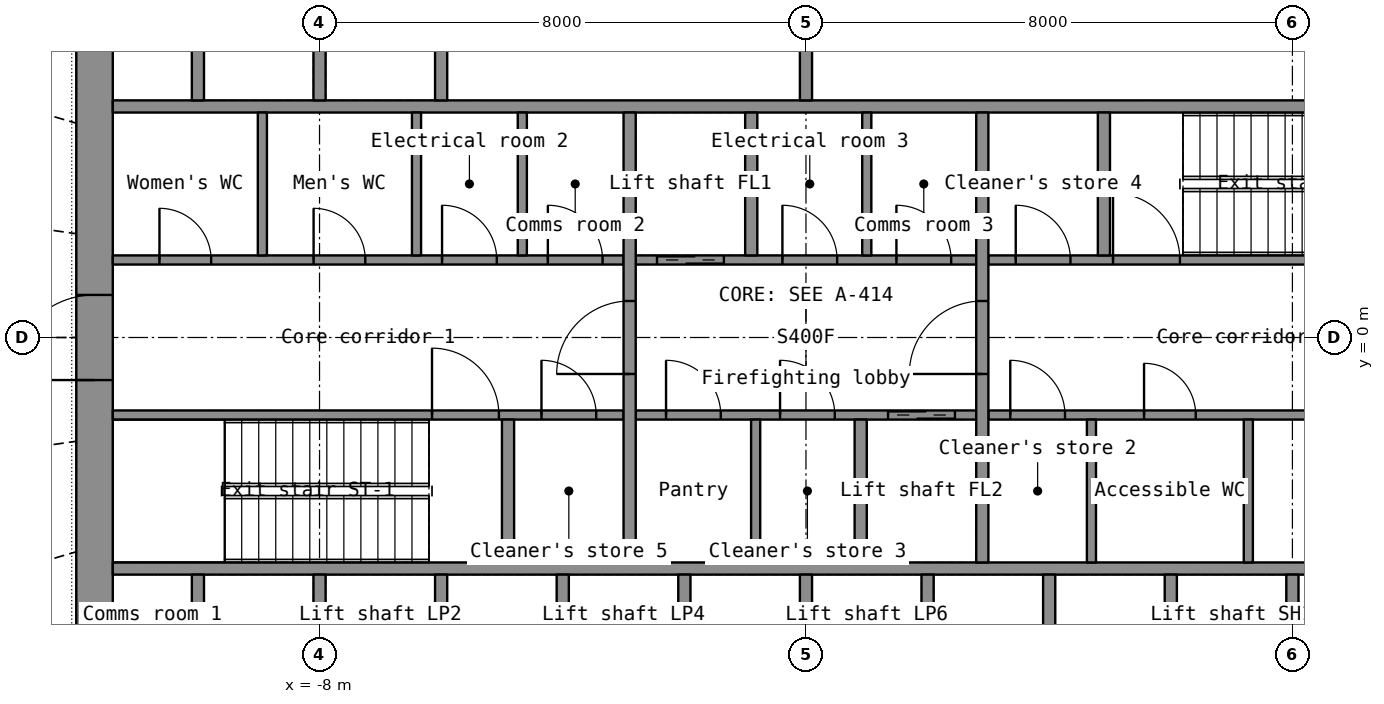
"""IFC4 building model, lengths in metres.
Left out: names, types, materials, properties, quantities, classifications, styles, units other than length and angle.
Written with IfcOpenShell. Run it as: python <this file> out.ifc"""

import sys

from ifc_helpers import new_model, si_unit, direction, frame, frame_2d, origin, place, context, subcontext, project, spatial, rectangle, extrude, element, fill, save


model = new_model("IFC4")
c1 = context("Model", 3, precision=1e-05, world=origin(), true_north=direction((0.0, 1.0)))
c2 = subcontext(c1, "Body", "Model", "MODEL_VIEW")
j1 = project(units=[si_unit("LENGTHUNIT", "METRE"), si_unit("PLANEANGLEUNIT", "RADIAN")], contexts=[c1])
p1 = place(None, origin())
s1 = spatial("IfcSite", under=j1, at=p1, CompositionType="ELEMENT")
p2 = place(p1, origin())
s2 = spatial("IfcBuilding", under=s1, at=p2, CompositionType="ELEMENT")
p3 = place(p2, frame((0.0, 0.0, 92.6)))
s3 = spatial("IfcBuildingStorey", under=s2, at=p3, CompositionType="ELEMENT", Elevation=92.6)
p4 = place(p3, frame((-11.7, -7.2, 0.0), z_axis=(0.0, 0.0, 1.0), x_axis=(0.0, 1.0, 0.0)))
e1 = element("IfcWall", 1, at=p4, inside=s3, PredefinedType="SHEAR", context=c2, shape_type="SweptSolid", body=[
    extrude(rectangle(XDim=14.4, YDim=0.6, at=frame_2d((7.2, 0.0))), origin(), (0.0, 0.0, 1.0), 4.1),
])
p5 = place(p4, frame((6.5, 0.0, 0.0)))
e2 = element("IfcOpeningElement", 2, at=p5, cuts=e1, PredefinedType="OPENING", context=c2, shape_type="SweptSolid", body=[
    extrude(rectangle(XDim=1.4, YDim=2.2, at=frame_2d((0.7, 1.1))), frame((0.0, 0.31, 0.0), z_axis=(0.0, -1.0, 0.0), x_axis=(1.0, 0.0, 0.0)), (0.0, 0.0, 1.0), 0.62),
])
for number, where, z_axis, x_axis in (
    (3, (-11.4, -3.8, 0.0), (0.0, 0.0, 1.0), (1.0, 0.0, 0.0)),
    (4, (-11.4, 3.8, 0.0), (0.0, 0.0, 1.0), (1.0, 0.0, 0.0)),
):
    element("IfcWall", number, at=place(p3, frame(where, z_axis=z_axis, x_axis=x_axis)), inside=s3, PredefinedType="SHEAR", context=c2, shape_type="SweptSolid", body=[
        extrude(rectangle(XDim=22.8, YDim=0.2, at=frame_2d((11.4, 0.0))), origin(), (0.0, 0.0, 1.0), 4.1),
    ])
for number, where, z_axis, x_axis in (
    (5, (-10.0, -6.6, 0.0), (0.0, 0.0, 1.0), (0.0, 1.0, 0.0)),
    (6, (-8.0, -6.6, 0.0), (0.0, 0.0, 1.0), (0.0, 1.0, 0.0)),
    (7, (-6.0, -6.6, 0.0), (0.0, 0.0, 1.0), (0.0, 1.0, 0.0)),
    (8, (-4.0, -6.6, 0.0), (0.0, 0.0, 1.0), (0.0, 1.0, 0.0)),
    (9, (-2.0, -6.6, 0.0), (0.0, 0.0, 1.0), (0.0, 1.0, 0.0)),
    (10, (0.0, -6.6, 0.0), (0.0, 0.0, 1.0), (0.0, 1.0, 0.0)),
    (11, (2.0, -6.6, 0.0), (0.0, 0.0, 1.0), (0.0, 1.0, 0.0)),
    (12, (4.0, -6.6, 0.0), (0.0, 0.0, 1.0), (0.0, 1.0, 0.0)),
    (13, (6.0, -6.6, 0.0), (0.0, 0.0, 1.0), (0.0, 1.0, 0.0)),
    (14, (8.0, -6.6, 0.0), (0.0, 0.0, 1.0), (0.0, 1.0, 0.0)),
    (15, (-10.0, 3.9, 0.0), (0.0, 0.0, 1.0), (0.0, 1.0, 0.0)),
    (16, (-8.0, 3.9, 0.0), (0.0, 0.0, 1.0), (0.0, 1.0, 0.0)),
    (17, (-6.0, 3.9, 0.0), (0.0, 0.0, 1.0), (0.0, 1.0, 0.0)),
):
    element("IfcWall", number, at=place(p3, frame(where, z_axis=z_axis, x_axis=x_axis)), inside=s3, PredefinedType="SHEAR", context=c2, shape_type="SweptSolid", body=[
        extrude(rectangle(XDim=2.7, YDim=0.2, at=frame_2d((1.35, 0.0))), origin(), (0.0, 0.0, 1.0), 4.1),
    ])
p6 = place(p3, frame((0.0, 3.9, 0.0), z_axis=(0.0, 0.0, 1.0), x_axis=(0.0, 1.0, 0.0)))
e18 = element("IfcWall", 18, at=p6, inside=s3, PredefinedType="PARTITIONING", context=c2, shape_type="SweptSolid", body=[
    extrude(rectangle(XDim=2.7, YDim=0.2, at=frame_2d((1.35, 0.0))), origin(), (0.0, 0.0, 1.0), 4.1),
])
p7 = place(p3, frame((-11.4, -1.275, 0.0), z_axis=(0.0, 0.0, 1.0), x_axis=(1.0, 0.0, 0.0)))
e19 = element("IfcWall", 19, at=p7, inside=s3, PredefinedType="SHEAR", context=c2, shape_type="SweptSolid", body=[
    extrude(rectangle(XDim=8.4, YDim=0.15, at=frame_2d((4.2, 0.0))), origin(), (0.0, 0.0, 1.0), 4.1),
])
p8 = place(p7, frame((5.25, 0.0, 0.0)))
e20 = element("IfcOpeningElement", 20, at=p8, cuts=e19, PredefinedType="OPENING", context=c2, shape_type="SweptSolid", body=[
    extrude(rectangle(XDim=1.1, YDim=2.15, at=frame_2d((0.55, 1.075))), frame((0.0, 0.085, 0.0), z_axis=(0.0, -1.0, 0.0), x_axis=(1.0, 0.0, 0.0)), (0.0, 0.0, 1.0), 0.17),
])
p9 = place(p7, frame((7.05, 0.0, 0.0)))
e21 = element("IfcOpeningElement", 21, at=p9, cuts=e19, PredefinedType="OPENING", context=c2, shape_type="SweptSolid", body=[
    extrude(rectangle(XDim=0.9, YDim=2.1, at=frame_2d((0.45, 1.05))), frame((0.0, 0.085, 0.0), z_axis=(0.0, -1.0, 0.0), x_axis=(1.0, 0.0, 0.0)), (0.0, 0.0, 1.0), 0.17),
])
p10 = place(p3, frame((-2.8, -1.275, 0.0), z_axis=(0.0, 0.0, 1.0), x_axis=(1.0, 0.0, 0.0)))
e22 = element("IfcWall", 22, at=p10, inside=s3, PredefinedType="SHEAR", context=c2, shape_type="SweptSolid", body=[
    extrude(rectangle(XDim=5.6, YDim=0.15, at=frame_2d((2.8, 0.0))), origin(), (0.0, 0.0, 1.0), 4.1),
])
p11 = place(p10, frame((4.15, 0.0, 0.0)))
e23 = element("IfcOpeningElement", 23, at=p11, cuts=e22, PredefinedType="OPENING", context=c2, shape_type="SweptSolid", body=[
    extrude(rectangle(XDim=1.1, YDim=2.2, at=frame_2d((0.55, 1.1))), frame((0.0, 0.085, 0.0), z_axis=(0.0, -1.0, 0.0), x_axis=(1.0, 0.0, 0.0)), (0.0, 0.0, 1.0), 0.17),
])
p12 = place(p10, frame((0.499, 0.0, 0.0)))
e24 = element("IfcOpeningElement", 24, at=p12, cuts=e22, PredefinedType="OPENING", context=c2, shape_type="SweptSolid", body=[
    extrude(rectangle(XDim=0.9, YDim=2.1, at=frame_2d((0.45, 1.05))), frame((0.0, 0.085, 0.0), z_axis=(0.0, -1.0, 0.0), x_axis=(1.0, 0.0, 0.0)), (0.0, 0.0, 1.0), 0.17),
])
p13 = place(p10, frame((2.374, 0.0, 0.0)))
e25 = element("IfcOpeningElement", 25, at=p13, cuts=e22, PredefinedType="OPENING", context=c2, shape_type="SweptSolid", body=[
    extrude(rectangle(XDim=0.9, YDim=2.1, at=frame_2d((0.45, 1.05))), frame((0.0, 0.085, 0.0), z_axis=(0.0, -1.0, 0.0), x_axis=(1.0, 0.0, 0.0)), (0.0, 0.0, 1.0), 0.17),
])
p14 = place(p3, frame((3.0, -1.275, 0.0), z_axis=(0.0, 0.0, 1.0), x_axis=(1.0, 0.0, 0.0)))
e26 = element("IfcWall", 26, at=p14, inside=s3, PredefinedType="PARTITIONING", context=c2, shape_type="SweptSolid", body=[
    extrude(rectangle(XDim=8.4, YDim=0.15, at=frame_2d((4.2, 0.0))), origin(), (0.0, 0.0, 1.0), 4.1),
])
p15 = place(p14, frame((0.36, 0.0, 0.0)))
e27 = element("IfcOpeningElement", 27, at=p15, cuts=e26, PredefinedType="OPENING", context=c2, shape_type="SweptSolid", body=[
    extrude(rectangle(XDim=0.9, YDim=2.1, at=frame_2d((0.45, 1.05))), frame((0.0, 0.085, 0.0), z_axis=(0.0, -1.0, 0.0), x_axis=(1.0, 0.0, 0.0)), (0.0, 0.0, 1.0), 0.17),
])
p16 = place(p14, frame((2.56, 0.0, 0.0)))
e28 = element("IfcOpeningElement", 28, at=p16, cuts=e26, PredefinedType="OPENING", context=c2, shape_type="SweptSolid", body=[
    extrude(rectangle(XDim=0.85, YDim=2.1, at=frame_2d((0.425, 1.05))), frame((0.0, 0.085, 0.0), z_axis=(0.0, -1.0, 0.0), x_axis=(1.0, 0.0, 0.0)), (0.0, 0.0, 1.0), 0.17),
])
p17 = place(p14, frame((5.95, 0.0, 0.0)))
e29 = element("IfcOpeningElement", 29, at=p17, cuts=e26, PredefinedType="OPENING", context=c2, shape_type="SweptSolid", body=[
    extrude(rectangle(XDim=0.85, YDim=2.1, at=frame_2d((0.425, 1.05))), frame((0.0, 0.085, 0.0), z_axis=(0.0, -1.0, 0.0), x_axis=(1.0, 0.0, 0.0)), (0.0, 0.0, 1.0), 0.17),
])
p18 = place(p3, frame((-11.4, 1.275, 0.0), z_axis=(0.0, 0.0, 1.0), x_axis=(1.0, 0.0, 0.0)))
e30 = element("IfcWall", 30, at=p18, inside=s3, PredefinedType="PARTITIONING", context=c2, shape_type="SweptSolid", body=[
    extrude(rectangle(XDim=8.4, YDim=0.15, at=frame_2d((4.2, 0.0))), origin(), (0.0, 0.0, 1.0), 4.1),
])
p19 = place(p18, frame((0.768, 0.0, 0.0)))
e31 = element("IfcOpeningElement", 31, at=p19, cuts=e30, PredefinedType="OPENING", context=c2, shape_type="SweptSolid", body=[
    extrude(rectangle(XDim=0.85, YDim=2.1, at=frame_2d((0.425, 1.05))), frame((0.0, 0.085, 0.0), z_axis=(0.0, -1.0, 0.0), x_axis=(1.0, 0.0, 0.0)), (0.0, 0.0, 1.0), 0.17),
])
p20 = place(p18, frame((3.302, 0.0, 0.0)))
e32 = element("IfcOpeningElement", 32, at=p20, cuts=e30, PredefinedType="OPENING", context=c2, shape_type="SweptSolid", body=[
    extrude(rectangle(XDim=0.85, YDim=2.1, at=frame_2d((0.425, 1.05))), frame((0.0, 0.085, 0.0), z_axis=(0.0, -1.0, 0.0), x_axis=(1.0, 0.0, 0.0)), (0.0, 0.0, 1.0), 0.17),
])
p21 = place(p18, frame((5.415, 0.0, 0.0)))
e33 = element("IfcOpeningElement", 33, at=p21, cuts=e30, PredefinedType="OPENING", context=c2, shape_type="SweptSolid", body=[
    extrude(rectangle(XDim=0.9, YDim=2.1, at=frame_2d((0.45, 1.05))), frame((0.0, 0.085, 0.0), z_axis=(0.0, -1.0, 0.0), x_axis=(1.0, 0.0, 0.0)), (0.0, 0.0, 1.0), 0.17),
])
p22 = place(p18, frame((7.155, 0.0, 0.0)))
e34 = element("IfcOpeningElement", 34, at=p22, cuts=e30, PredefinedType="OPENING", context=c2, shape_type="SweptSolid", body=[
    extrude(rectangle(XDim=0.9, YDim=2.1, at=frame_2d((0.45, 1.05))), frame((0.0, 0.085, 0.0), z_axis=(0.0, -1.0, 0.0), x_axis=(1.0, 0.0, 0.0)), (0.0, 0.0, 1.0), 0.17),
])
p23 = place(p3, frame((-2.8, 1.275, 0.0), z_axis=(0.0, 0.0, 1.0), x_axis=(1.0, 0.0, 0.0)))
e35 = element("IfcWall", 35, at=p23, inside=s3, PredefinedType="SHEAR", context=c2, shape_type="SweptSolid", body=[
    extrude(rectangle(XDim=5.6, YDim=0.15, at=frame_2d((2.8, 0.0))), origin(), (0.0, 0.0, 1.0), 4.1),
])
p24 = place(p23, frame((0.35, 0.0, 0.0)))
e36 = element("IfcOpeningElement", 36, at=p24, cuts=e35, PredefinedType="OPENING", context=c2, shape_type="SweptSolid", body=[
    extrude(rectangle(XDim=1.1, YDim=2.2, at=frame_2d((0.55, 1.1))), frame((0.0, 0.085, 0.0), z_axis=(0.0, -1.0, 0.0), x_axis=(1.0, 0.0, 0.0)), (0.0, 0.0, 1.0), 0.17),
])
p25 = place(p23, frame((2.413, 0.0, 0.0)))
e37 = element("IfcOpeningElement", 37, at=p25, cuts=e35, PredefinedType="OPENING", context=c2, shape_type="SweptSolid", body=[
    extrude(rectangle(XDim=0.9, YDim=2.1, at=frame_2d((0.45, 1.05))), frame((0.0, 0.085, 0.0), z_axis=(0.0, -1.0, 0.0), x_axis=(1.0, 0.0, 0.0)), (0.0, 0.0, 1.0), 0.17),
])
p26 = place(p23, frame((4.288, 0.0, 0.0)))
e38 = element("IfcOpeningElement", 38, at=p26, cuts=e35, PredefinedType="OPENING", context=c2, shape_type="SweptSolid", body=[
    extrude(rectangle(XDim=0.9, YDim=2.1, at=frame_2d((0.45, 1.05))), frame((0.0, 0.085, 0.0), z_axis=(0.0, -1.0, 0.0), x_axis=(1.0, 0.0, 0.0)), (0.0, 0.0, 1.0), 0.17),
])
p27 = place(p3, frame((3.0, 1.275, 0.0), z_axis=(0.0, 0.0, 1.0), x_axis=(1.0, 0.0, 0.0)))
e39 = element("IfcWall", 39, at=p27, inside=s3, PredefinedType="SHEAR", context=c2, shape_type="SweptSolid", body=[
    extrude(rectangle(XDim=8.4, YDim=0.15, at=frame_2d((4.2, 0.0))), origin(), (0.0, 0.0, 1.0), 4.1),
])
p28 = place(p27, frame((2.05, 0.0, 0.0)))
e40 = element("IfcOpeningElement", 40, at=p28, cuts=e39, PredefinedType="OPENING", context=c2, shape_type="SweptSolid", body=[
    extrude(rectangle(XDim=1.1, YDim=2.15, at=frame_2d((0.55, 1.075))), frame((0.0, 0.085, 0.0), z_axis=(0.0, -1.0, 0.0), x_axis=(1.0, 0.0, 0.0)), (0.0, 0.0, 1.0), 0.17),
])
p29 = place(p27, frame((0.45, 0.0, 0.0)))
e41 = element("IfcOpeningElement", 41, at=p29, cuts=e39, PredefinedType="OPENING", context=c2, shape_type="SweptSolid", body=[
    extrude(rectangle(XDim=0.9, YDim=2.1, at=frame_2d((0.45, 1.05))), frame((0.0, 0.085, 0.0), z_axis=(0.0, -1.0, 0.0), x_axis=(1.0, 0.0, 0.0)), (0.0, 0.0, 1.0), 0.17),
])
p30 = place(p3, frame((-2.9, -3.7, 0.0), z_axis=(0.0, 0.0, 1.0), x_axis=(0.0, 1.0, 0.0)))
e42 = element("IfcWall", 42, at=p30, inside=s3, PredefinedType="SHEAR", context=c2, shape_type="SweptSolid", body=[
    extrude(rectangle(XDim=7.4, YDim=0.2, at=frame_2d((3.7, 0.0))), origin(), (0.0, 0.0, 1.0), 4.1),
])
p31 = place(p30, frame((3.1, 0.0, 0.0)))
e43 = element("IfcOpeningElement", 43, at=p31, cuts=e42, PredefinedType="OPENING", context=c2, shape_type="SweptSolid", body=[
    extrude(rectangle(XDim=1.2, YDim=2.2, at=frame_2d((0.6, 1.1))), frame((0.0, 0.11, 0.0), z_axis=(0.0, -1.0, 0.0), x_axis=(1.0, 0.0, 0.0)), (0.0, 0.0, 1.0), 0.22),
])
p32 = place(p3, frame((2.9, -3.7, 0.0), z_axis=(0.0, 0.0, 1.0), x_axis=(0.0, 1.0, 0.0)))
e44 = element("IfcWall", 44, at=p32, inside=s3, PredefinedType="SHEAR", context=c2, shape_type="SweptSolid", body=[
    extrude(rectangle(XDim=7.4, YDim=0.2, at=frame_2d((3.7, 0.0))), origin(), (0.0, 0.0, 1.0), 4.1),
])
p33 = place(p32, frame((3.1, 0.0, 0.0)))
e45 = element("IfcOpeningElement", 45, at=p33, cuts=e44, PredefinedType="OPENING", context=c2, shape_type="SweptSolid", body=[
    extrude(rectangle(XDim=1.2, YDim=2.2, at=frame_2d((0.6, 1.1))), frame((0.0, 0.11, 0.0), z_axis=(0.0, -1.0, 0.0), x_axis=(1.0, 0.0, 0.0)), (0.0, 0.0, 1.0), 0.22),
])
for number, where, z_axis, x_axis in (
    (46, (-0.9, 1.35, 0.0), (0.0, 0.0, 1.0), (0.0, 1.0, 0.0)),
    (47, (0.9, -3.7, 0.0), (0.0, 0.0, 1.0), (0.0, 1.0, 0.0)),
    (48, (-4.9, -3.7, 0.0), (0.0, 0.0, 1.0), (0.0, 1.0, 0.0)),
    (49, (4.9, 1.35, 0.0), (0.0, 0.0, 1.0), (0.0, 1.0, 0.0)),
):
    element("IfcWall", number, at=place(p3, frame(where, z_axis=z_axis, x_axis=x_axis)), inside=s3, PredefinedType="SHEAR", context=c2, shape_type="SweptSolid", body=[
        extrude(rectangle(XDim=2.35, YDim=0.2, at=frame_2d((1.175, 0.0))), origin(), (0.0, 0.0, 1.0), 4.1),
    ])
for number, where, z_axis, x_axis in (
    (50, (-8.94, 1.35, 0.0), (0.0, 0.0, 1.0), (0.0, 1.0, 0.0)),
    (51, (-6.405, 1.35, 0.0), (0.0, 0.0, 1.0), (0.0, 1.0, 0.0)),
    (52, (-4.665, 1.35, 0.0), (0.0, 0.0, 1.0), (0.0, 1.0, 0.0)),
    (53, (4.695, -3.7, 0.0), (0.0, 0.0, 1.0), (0.0, 1.0, 0.0)),
    (54, (7.275, -3.7, 0.0), (0.0, 0.0, 1.0), (0.0, 1.0, 0.0)),
    (55, (1.0, 1.35, 0.0), (0.0, 0.0, 1.0), (0.0, 1.0, 0.0)),
    (56, (-0.827, -3.7, 0.0), (0.0, 0.0, 1.0), (0.0, 1.0, 0.0)),
):
    element("IfcWall", number, at=place(p3, frame(where, z_axis=z_axis, x_axis=x_axis)), inside=s3, PredefinedType="PARTITIONING", context=c2, shape_type="SweptSolid", body=[
        extrude(rectangle(XDim=2.35, YDim=0.15, at=frame_2d((1.175, 0.0))), origin(), (0.0, 0.0, 1.0), 4.1),
    ])
p34 = place(p5, origin())
e57 = element("IfcDoor", 57, at=p34, inside=s3, OperationType="DOUBLE_DOOR_SINGLE_SWING", PredefinedType="DOOR", context=c2, shape_type="SweptSolid", body=[
    extrude(rectangle(XDim=1.4, YDim=2.2, at=frame_2d((0.7, 1.1))), frame((0.0, 0.025, 0.0), z_axis=(0.0, -1.0, 0.0), x_axis=(1.0, 0.0, 0.0)), (0.0, 0.0, 1.0), 0.05),
])
fill(e2, e57)
p35 = place(p31, origin())
e58 = element("IfcDoor", 58, at=p35, inside=s3, OperationType="SINGLE_SWING_LEFT", PredefinedType="DOOR", context=c2, shape_type="SweptSolid", body=[
    extrude(rectangle(XDim=1.2, YDim=2.2, at=frame_2d((0.6, 1.1))), frame((0.0, 0.025, 0.0), z_axis=(0.0, -1.0, 0.0), x_axis=(1.0, 0.0, 0.0)), (0.0, 0.0, 1.0), 0.05),
])
fill(e43, e58)
p36 = place(p33, origin())
e59 = element("IfcDoor", 59, at=p36, inside=s3, OperationType="SINGLE_SWING_LEFT", PredefinedType="DOOR", context=c2, shape_type="SweptSolid", body=[
    extrude(rectangle(XDim=1.2, YDim=2.2, at=frame_2d((0.6, 1.1))), frame((0.0, 0.025, 0.0), z_axis=(0.0, -1.0, 0.0), x_axis=(1.0, 0.0, 0.0)), (0.0, 0.0, 1.0), 0.05),
])
fill(e45, e59)
p37 = place(p24, origin())
e60 = element("IfcDoor", 60, at=p37, inside=s3, OperationType="DOUBLE_DOOR_SLIDING", PredefinedType="DOOR", context=c2, shape_type="SweptSolid", body=[
    extrude(rectangle(XDim=1.1, YDim=2.2, at=frame_2d((0.55, 1.1))), frame((0.0, 0.025, 0.0), z_axis=(0.0, -1.0, 0.0), x_axis=(1.0, 0.0, 0.0)), (0.0, 0.0, 1.0), 0.05),
])
fill(e36, e60)
p38 = place(p11, origin())
e61 = element("IfcDoor", 61, at=p38, inside=s3, OperationType="DOUBLE_DOOR_SLIDING", PredefinedType="DOOR", context=c2, shape_type="SweptSolid", body=[
    extrude(rectangle(XDim=1.1, YDim=2.2, at=frame_2d((0.55, 1.1))), frame((0.0, 0.025, 0.0), z_axis=(0.0, -1.0, 0.0), x_axis=(1.0, 0.0, 0.0)), (0.0, 0.0, 1.0), 0.05),
])
fill(e23, e61)
p39 = place(p8, origin())
e62 = element("IfcDoor", 62, at=p39, inside=s3, OperationType="SINGLE_SWING_LEFT", PredefinedType="DOOR", context=c2, shape_type="SweptSolid", body=[
    extrude(rectangle(XDim=1.1, YDim=2.15, at=frame_2d((0.55, 1.075))), frame((0.0, 0.025, 0.0), z_axis=(0.0, -1.0, 0.0), x_axis=(1.0, 0.0, 0.0)), (0.0, 0.0, 1.0), 0.05),
])
fill(e20, e62)
p40 = place(p28, origin())
e63 = element("IfcDoor", 63, at=p40, inside=s3, OperationType="SINGLE_SWING_LEFT", PredefinedType="DOOR", context=c2, shape_type="SweptSolid", body=[
    extrude(rectangle(XDim=1.1, YDim=2.15, at=frame_2d((0.55, 1.075))), frame((0.0, 0.025, 0.0), z_axis=(0.0, -1.0, 0.0), x_axis=(1.0, 0.0, 0.0)), (0.0, 0.0, 1.0), 0.05),
])
fill(e40, e63)
p41 = place(p19, origin())
e64 = element("IfcDoor", 64, at=p41, inside=s3, OperationType="SINGLE_SWING_LEFT", PredefinedType="DOOR", context=c2, shape_type="SweptSolid", body=[
    extrude(rectangle(XDim=0.85, YDim=2.1, at=frame_2d((0.425, 1.05))), frame((0.0, 0.025, 0.0), z_axis=(0.0, -1.0, 0.0), x_axis=(1.0, 0.0, 0.0)), (0.0, 0.0, 1.0), 0.05),
])
fill(e31, e64)
p42 = place(p20, origin())
e65 = element("IfcDoor", 65, at=p42, inside=s3, OperationType="SINGLE_SWING_LEFT", PredefinedType="DOOR", context=c2, shape_type="SweptSolid", body=[
    extrude(rectangle(XDim=0.85, YDim=2.1, at=frame_2d((0.425, 1.05))), frame((0.0, 0.025, 0.0), z_axis=(0.0, -1.0, 0.0), x_axis=(1.0, 0.0, 0.0)), (0.0, 0.0, 1.0), 0.05),
])
fill(e32, e65)
p43 = place(p21, origin())
e66 = element("IfcDoor", 66, at=p43, inside=s3, OperationType="SINGLE_SWING_LEFT", PredefinedType="DOOR", context=c2, shape_type="SweptSolid", body=[
    extrude(rectangle(XDim=0.9, YDim=2.1, at=frame_2d((0.45, 1.05))), frame((0.0, 0.025, 0.0), z_axis=(0.0, -1.0, 0.0), x_axis=(1.0, 0.0, 0.0)), (0.0, 0.0, 1.0), 0.05),
])
fill(e33, e66)
p44 = place(p22, origin())
e67 = element("IfcDoor", 67, at=p44, inside=s3, OperationType="SINGLE_SWING_LEFT", PredefinedType="DOOR", context=c2, shape_type="SweptSolid", body=[
    extrude(rectangle(XDim=0.9, YDim=2.1, at=frame_2d((0.45, 1.05))), frame((0.0, 0.025, 0.0), z_axis=(0.0, -1.0, 0.0), x_axis=(1.0, 0.0, 0.0)), (0.0, 0.0, 1.0), 0.05),
])
fill(e34, e67)
p45 = place(p15, origin())
e68 = element("IfcDoor", 68, at=p45, inside=s3, OperationType="SINGLE_SWING_LEFT", PredefinedType="DOOR", context=c2, shape_type="SweptSolid", body=[
    extrude(rectangle(XDim=0.9, YDim=2.1, at=frame_2d((0.45, 1.05))), frame((0.0, 0.025, 0.0), z_axis=(0.0, -1.0, 0.0), x_axis=(1.0, 0.0, 0.0)), (0.0, 0.0, 1.0), 0.05),
])
fill(e27, e68)
p46 = place(p16, origin())
e69 = element("IfcDoor", 69, at=p46, inside=s3, OperationType="SINGLE_SWING_LEFT", PredefinedType="DOOR", context=c2, shape_type="SweptSolid", body=[
    extrude(rectangle(XDim=0.85, YDim=2.1, at=frame_2d((0.425, 1.05))), frame((0.0, 0.025, 0.0), z_axis=(0.0, -1.0, 0.0), x_axis=(1.0, 0.0, 0.0)), (0.0, 0.0, 1.0), 0.05),
])
fill(e28, e69)
p47 = place(p25, origin())
e70 = element("IfcDoor", 70, at=p47, inside=s3, OperationType="SINGLE_SWING_LEFT", PredefinedType="DOOR", context=c2, shape_type="SweptSolid", body=[
    extrude(rectangle(XDim=0.9, YDim=2.1, at=frame_2d((0.45, 1.05))), frame((0.0, 0.025, 0.0), z_axis=(0.0, -1.0, 0.0), x_axis=(1.0, 0.0, 0.0)), (0.0, 0.0, 1.0), 0.05),
])
fill(e37, e70)
p48 = place(p26, origin())
e71 = element("IfcDoor", 71, at=p48, inside=s3, OperationType="SINGLE_SWING_LEFT", PredefinedType="DOOR", context=c2, shape_type="SweptSolid", body=[
    extrude(rectangle(XDim=0.9, YDim=2.1, at=frame_2d((0.45, 1.05))), frame((0.0, 0.025, 0.0), z_axis=(0.0, -1.0, 0.0), x_axis=(1.0, 0.0, 0.0)), (0.0, 0.0, 1.0), 0.05),
])
fill(e38, e71)
p49 = place(p12, origin())
e72 = element("IfcDoor", 72, at=p49, inside=s3, OperationType="SINGLE_SWING_LEFT", PredefinedType="DOOR", context=c2, shape_type="SweptSolid", body=[
    extrude(rectangle(XDim=0.9, YDim=2.1, at=frame_2d((0.45, 1.05))), frame((0.0, 0.025, 0.0), z_axis=(0.0, -1.0, 0.0), x_axis=(1.0, 0.0, 0.0)), (0.0, 0.0, 1.0), 0.05),
])
fill(e24, e72)
p50 = place(p13, origin())
e73 = element("IfcDoor", 73, at=p50, inside=s3, OperationType="SINGLE_SWING_LEFT", PredefinedType="DOOR", context=c2, shape_type="SweptSolid", body=[
    extrude(rectangle(XDim=0.9, YDim=2.1, at=frame_2d((0.45, 1.05))), frame((0.0, 0.025, 0.0), z_axis=(0.0, -1.0, 0.0), x_axis=(1.0, 0.0, 0.0)), (0.0, 0.0, 1.0), 0.05),
])
fill(e25, e73)
p51 = place(p29, origin())
e74 = element("IfcDoor", 74, at=p51, inside=s3, OperationType="SINGLE_SWING_LEFT", PredefinedType="DOOR", context=c2, shape_type="SweptSolid", body=[
    extrude(rectangle(XDim=0.9, YDim=2.1, at=frame_2d((0.45, 1.05))), frame((0.0, 0.025, 0.0), z_axis=(0.0, -1.0, 0.0), x_axis=(1.0, 0.0, 0.0)), (0.0, 0.0, 1.0), 0.05),
])
fill(e41, e74)
p52 = place(p9, origin())
e75 = element("IfcDoor", 75, at=p52, inside=s3, OperationType="SINGLE_SWING_LEFT", PredefinedType="DOOR", context=c2, shape_type="SweptSolid", body=[
    extrude(rectangle(XDim=0.9, YDim=2.1, at=frame_2d((0.45, 1.05))), frame((0.0, 0.025, 0.0), z_axis=(0.0, -1.0, 0.0), x_axis=(1.0, 0.0, 0.0)), (0.0, 0.0, 1.0), 0.05),
])
fill(e21, e75)
save(model, sys.argv[1])
